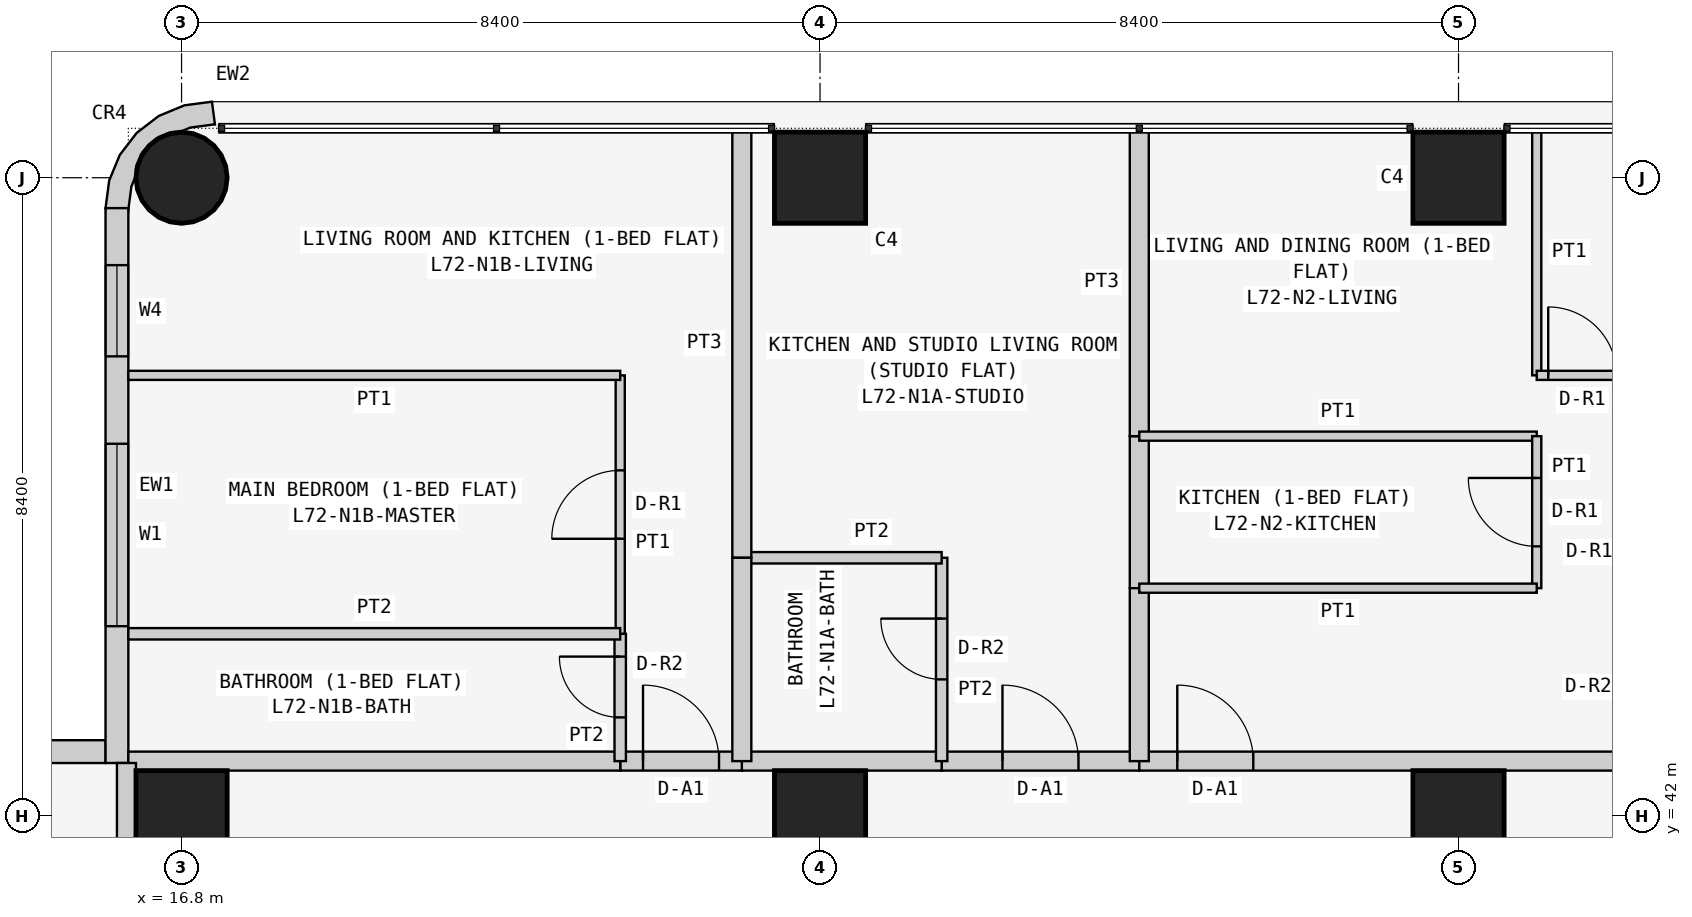
"""IFC4 building model, lengths in metres.
Left out: names, types, materials, properties, quantities, classifications, styles, units other than length and angle.
Written with IfcOpenShell. Run it as: python <this file> out.ifc"""

import sys

from ifc_helpers import new_model, si_unit, direction, frame, frame_2d, origin, origin_2d, place, context, subcontext, project, spatial, polyline, rectangle, circle, outline, extrude, element, fill, save


model = new_model("IFC4")
c1 = context("Model", 3, precision=1e-05, world=origin(), true_north=direction((0.0, 1.0)))
c2 = subcontext(c1, "Body", "Model", "MODEL_VIEW")
j1 = project(units=[si_unit("LENGTHUNIT", "METRE"), si_unit("PLANEANGLEUNIT", "RADIAN")], contexts=[c1])
p1 = place(None, origin())
s1 = spatial("IfcSite", under=j1, at=p1, CompositionType="ELEMENT")
p2 = place(p1, origin())
s2 = spatial("IfcBuilding", under=s1, at=p2, CompositionType="ELEMENT")
p3 = place(p2, frame((0.0, 0.0, 275.7)))
s3 = spatial("IfcBuildingStorey", under=s2, at=p3, CompositionType="ELEMENT", Elevation=275.7)
p4 = place(p3, frame((16.8, 42.0, 0.0), z_axis=(0.0, 0.0, 1.0), x_axis=(1.0, 0.0, 0.0)))
e1 = element("IfcColumn", 1, at=p4, inside=s3, PredefinedType="COLUMN", context=c2, shape_type="SweptSolid", body=[
    extrude(rectangle(XDim=1.2, YDim=1.2, at=origin_2d()), origin(), (0.0, 0.0, 1.0), 3.6),
])
p5 = place(p3, frame((16.8, 50.4, 0.0), z_axis=(0.0, 0.0, 1.0), x_axis=(1.0, 0.0, 0.0)))
e2 = element("IfcColumn", 2, at=p5, inside=s3, PredefinedType="COLUMN", context=c2, shape_type="SweptSolid", body=[
    extrude(circle(Radius=0.6, at=origin_2d()), origin(), (0.0, 0.0, 1.0), 3.6),
])
for number, where, z_axis, x_axis in (
    (3, (25.2, 42.0, 0.0), (0.0, 0.0, 1.0), (1.0, 0.0, 0.0)),
    (4, (25.2, 50.4, 0.0), (0.0, 0.0, 1.0), (1.0, 0.0, 0.0)),
    (5, (33.6, 42.0, 0.0), (0.0, 0.0, 1.0), (1.0, 0.0, 0.0)),
    (6, (33.6, 50.4, 0.0), (0.0, 0.0, 1.0), (1.0, 0.0, 0.0)),
):
    element("IfcColumn", number, at=place(p3, frame(where, z_axis=z_axis, x_axis=x_axis)), inside=s3, PredefinedType="COLUMN", context=c2, shape_type="SweptSolid", body=[
        extrude(rectangle(XDim=1.2, YDim=1.2, at=origin_2d()), origin(), (0.0, 0.0, 1.0), 3.6),
    ])
p6 = place(p3, frame((15.8, 42.85, 0.0), z_axis=(0.0, 0.0, 1.0), x_axis=(-1.0, 0.0, 0.0)))
e7 = element("IfcWall", 7, at=p6, inside=s3, PredefinedType="SOLIDWALL", context=c2, shape_type="SweptSolid", body=[
    extrude(rectangle(XDim=7.0, YDim=0.3, at=frame_2d((3.5, 0.0))), origin(), (0.0, 0.0, 1.0), 3.45),
])
p7 = place(p6, frame((1.5, 0.0, 0.9)))
e8 = element("IfcOpeningElement", 8, at=p7, cuts=e7, PredefinedType="OPENING", context=c2, shape_type="SweptSolid", body=[
    extrude(rectangle(XDim=2.4, YDim=1.5, at=frame_2d((1.2, 0.75))), frame((0.0, 0.16, 0.0), z_axis=(0.0, -1.0, 0.0), x_axis=(1.0, 0.0, 0.0)), (0.0, 0.0, 1.0), 0.32),
])
p8 = place(p6, frame((5.05, 0.0, 0.9)))
e9 = element("IfcOpeningElement", 9, at=p8, cuts=e7, PredefinedType="OPENING", context=c2, shape_type="SweptSolid", body=[
    extrude(rectangle(XDim=1.2, YDim=1.5, at=frame_2d((0.6, 0.75))), frame((0.0, 0.16, 0.0), z_axis=(0.0, -1.0, 0.0), x_axis=(1.0, 0.0, 0.0)), (0.0, 0.0, 1.0), 0.32),
])
p9 = place(p3, frame((15.95, 50.0, 0.0), z_axis=(0.0, 0.0, 1.0), x_axis=(0.0, -1.0, 0.0)))
e10 = element("IfcWall", 10, at=p9, inside=s3, PredefinedType="SOLIDWALL", context=c2, shape_type="SweptSolid", body=[
    extrude(rectangle(XDim=7.3, YDim=0.3, at=frame_2d((3.65, 0.0))), origin(), (0.0, 0.0, 1.0), 3.45),
])
p10 = place(p9, frame((3.1, 0.0, 0.9)))
e11 = element("IfcOpeningElement", 11, at=p10, cuts=e10, PredefinedType="OPENING", context=c2, shape_type="SweptSolid", body=[
    extrude(rectangle(XDim=2.4, YDim=1.5, at=frame_2d((1.2, 0.75))), frame((0.0, 0.16, 0.0), z_axis=(0.0, -1.0, 0.0), x_axis=(1.0, 0.0, 0.0)), (0.0, 0.0, 1.0), 0.32),
])
p11 = place(p9, frame((0.75, 0.0, 0.9)))
e12 = element("IfcOpeningElement", 12, at=p11, cuts=e10, PredefinedType="OPENING", context=c2, shape_type="SweptSolid", body=[
    extrude(rectangle(XDim=1.2, YDim=1.5, at=frame_2d((0.6, 0.75))), frame((0.0, 0.16, 0.0), z_axis=(0.0, -1.0, 0.0), x_axis=(1.0, 0.0, 0.0)), (0.0, 0.0, 1.0), 0.32),
])
p12 = place(p3, frame((17.162, 50.976, 0.0), z_axis=(0.0, 0.0, 1.0), x_axis=(-0.707106781187, 0.707106781187, 0.0)))
e13 = element("IfcWall", 13, at=p12, inside=s3, PredefinedType="SOLIDWALL", context=c2, shape_type="SweptSolid", body=[
    extrude(outline(polyline([(0.047, -0.129), (0.033, -0.143), (0.273, -0.327), (0.495, -0.037), (0.635, 0.301), (0.683, 0.663), (0.635, 1.025), (0.495, 1.363), (0.273, 1.653), (0.033, 1.469), (0.047, 1.455), (0.233, 1.212), (0.292, 1.069), (0.358, 1.003), (0.449, 0.782), (0.449, 0.543), (0.358, 0.322), (0.292, 0.257), (0.233, 0.114), (0.047, -0.129)])), origin(), (0.0, 0.0, 1.0), 3.45),
])
p13 = place(p3, frame((26.8, 42.725, 0.0), z_axis=(0.0, 0.0, 1.0), x_axis=(1.0, 0.0, 0.0)))
e14 = element("IfcWall", 14, at=p13, inside=s3, PredefinedType="PARTITIONING", context=c2, shape_type="SweptSolid", body=[
    extrude(rectangle(XDim=2.6, YDim=0.25, at=frame_2d((1.3, 0.0))), origin(), (0.0, 0.0, 1.0), 3.45),
])
p14 = place(p13, frame((0.8, 0.0, 0.0)))
e15 = element("IfcOpeningElement", 15, at=p14, cuts=e14, PredefinedType="OPENING", context=c2, shape_type="SweptSolid", body=[
    extrude(rectangle(XDim=1.0, YDim=2.1, at=frame_2d((0.5, 1.05))), frame((0.0, 0.135, 0.0), z_axis=(0.0, -1.0, 0.0), x_axis=(1.0, 0.0, 0.0)), (0.0, 0.0, 1.0), 0.27),
])
p15 = place(p3, frame((24.171, 42.725, 0.0), z_axis=(0.0, 0.0, 1.0), x_axis=(1.0, 0.0, 0.0)))
e16 = element("IfcWall", 16, at=p15, inside=s3, PredefinedType="PARTITIONING", context=c2, shape_type="SweptSolid", body=[
    extrude(rectangle(XDim=2.629, YDim=0.25, at=frame_2d((1.314, 0.0))), origin(), (0.0, 0.0, 1.0), 3.45),
])
p16 = place(p3, frame((22.571, 42.725, 0.0), z_axis=(0.0, 0.0, 1.0), x_axis=(1.0, 0.0, 0.0)))
e17 = element("IfcWall", 17, at=p16, inside=s3, PredefinedType="PARTITIONING", context=c2, shape_type="SweptSolid", body=[
    extrude(rectangle(XDim=1.6, YDim=0.25, at=frame_2d((0.8, 0.0))), origin(), (0.0, 0.0, 1.0), 3.45),
])
p17 = place(p16, frame((0.3, 0.0, 0.0)))
e18 = element("IfcOpeningElement", 18, at=p17, cuts=e17, PredefinedType="OPENING", context=c2, shape_type="SweptSolid", body=[
    extrude(rectangle(XDim=1.0, YDim=2.1, at=frame_2d((0.5, 1.05))), frame((0.0, 0.135, 0.0), z_axis=(0.0, -1.0, 0.0), x_axis=(1.0, 0.0, 0.0)), (0.0, 0.0, 1.0), 0.27),
])
p18 = place(p3, frame((16.1, 42.725, 0.0), z_axis=(0.0, 0.0, 1.0), x_axis=(1.0, 0.0, 0.0)))
e19 = element("IfcWall", 19, at=p18, inside=s3, PredefinedType="PARTITIONING", context=c2, shape_type="SweptSolid", body=[
    extrude(rectangle(XDim=6.471, YDim=0.25, at=frame_2d((3.235, 0.0))), origin(), (0.0, 0.0, 1.0), 3.45),
])
p19 = place(p3, frame((29.4, 42.725, 0.0), z_axis=(0.0, 0.0, 1.0), x_axis=(1.0, 0.0, 0.0)))
e20 = element("IfcWall", 20, at=p19, inside=s3, PredefinedType="PARTITIONING", context=c2, shape_type="SweptSolid", body=[
    extrude(rectangle(XDim=6.429, YDim=0.25, at=frame_2d((3.215, 0.0))), origin(), (0.0, 0.0, 1.0), 3.45),
])
p20 = place(p19, frame((0.5, 0.0, 0.0)))
e21 = element("IfcOpeningElement", 21, at=p20, cuts=e20, PredefinedType="OPENING", context=c2, shape_type="SweptSolid", body=[
    extrude(rectangle(XDim=1.0, YDim=2.1, at=frame_2d((0.5, 1.05))), frame((0.0, 0.135, 0.0), z_axis=(0.0, -1.0, 0.0), x_axis=(1.0, 0.0, 0.0)), (0.0, 0.0, 1.0), 0.27),
])
p21 = place(p3, frame((16.075, 35.829, 0.0), z_axis=(0.0, 0.0, 1.0), x_axis=(0.0, 1.0, 0.0)))
e22 = element("IfcWall", 22, at=p21, inside=s3, PredefinedType="PARTITIONING", context=c2, shape_type="SweptSolid", body=[
    extrude(rectangle(XDim=6.871, YDim=0.25, at=frame_2d((3.436, 0.0))), origin(), (0.0, 0.0, 1.0), 3.45),
])
p22 = place(p3, frame((26.8, 42.725, 0.0), z_axis=(0.0, 0.0, 1.0), x_axis=(0.0, 1.0, 0.0)))
e23 = element("IfcWall", 23, at=p22, inside=s3, PredefinedType="PARTITIONING", context=c2, shape_type="SweptSolid", body=[
    extrude(rectangle(XDim=2.675, YDim=0.15, at=frame_2d((1.337, 0.0))), origin(), (0.0, 0.0, 1.0), 3.45),
])
p23 = place(p22, frame((1.075, 0.0, 0.0)))
e24 = element("IfcOpeningElement", 24, at=p23, cuts=e23, PredefinedType="OPENING", context=c2, shape_type="SweptSolid", body=[
    extrude(rectangle(XDim=0.8, YDim=2.1, at=frame_2d((0.4, 1.05))), frame((0.0, 0.085, 0.0), z_axis=(0.0, -1.0, 0.0), x_axis=(1.0, 0.0, 0.0)), (0.0, 0.0, 1.0), 0.17),
])
p24 = place(p3, frame((26.8, 45.4, 0.0), z_axis=(0.0, 0.0, 1.0), x_axis=(-1.0, 0.0, 0.0)))
e25 = element("IfcWall", 25, at=p24, inside=s3, PredefinedType="PARTITIONING", context=c2, shape_type="SweptSolid", body=[
    extrude(rectangle(XDim=2.629, YDim=0.15, at=frame_2d((1.314, 0.0))), origin(), (0.0, 0.0, 1.0), 3.45),
])
p25 = place(p3, frame((24.171, 45.4, 0.0), z_axis=(0.0, 0.0, 1.0), x_axis=(0.0, 1.0, 0.0)))
e26 = element("IfcWall", 26, at=p25, inside=s3, PredefinedType="PARTITIONING", context=c2, shape_type="SweptSolid", body=[
    extrude(rectangle(XDim=5.65, YDim=0.25, at=frame_2d((2.825, 0.0))), origin(), (0.0, 0.0, 1.0), 3.45),
])
p26 = place(p3, frame((29.4, 47.0, 0.0), z_axis=(0.0, 0.0, 1.0), x_axis=(0.0, -1.0, 0.0)))
e27 = element("IfcWall", 27, at=p26, inside=s3, PredefinedType="PARTITIONING", context=c2, shape_type="SweptSolid", body=[
    extrude(rectangle(XDim=2.0, YDim=0.25, at=frame_2d((1.0, 0.0))), origin(), (0.0, 0.0, 1.0), 2.848),
])
p27 = place(p3, frame((29.4, 45.0, 0.0), z_axis=(0.0, 0.0, 1.0), x_axis=(0.0, -1.0, 0.0)))
e28 = element("IfcWall", 28, at=p27, inside=s3, PredefinedType="PARTITIONING", context=c2, shape_type="SweptSolid", body=[
    extrude(rectangle(XDim=2.275, YDim=0.25, at=frame_2d((1.137, 0.0))), origin(), (0.0, 0.0, 1.0), 2.848),
])
p28 = place(p3, frame((29.4, 51.05, 0.0), z_axis=(0.0, 0.0, 1.0), x_axis=(0.0, -1.0, 0.0)))
e29 = element("IfcWall", 29, at=p28, inside=s3, PredefinedType="PARTITIONING", context=c2, shape_type="SweptSolid", body=[
    extrude(rectangle(XDim=4.05, YDim=0.25, at=frame_2d((2.025, 0.0))), origin(), (0.0, 0.0, 1.0), 2.848),
])
p29 = place(p3, frame((24.171, 45.4, 0.0), z_axis=(0.0, 0.0, 1.0), x_axis=(0.0, -1.0, 0.0)))
e30 = element("IfcWall", 30, at=p29, inside=s3, PredefinedType="PARTITIONING", context=c2, shape_type="SweptSolid", body=[
    extrude(rectangle(XDim=2.675, YDim=0.25, at=frame_2d((1.337, 0.0))), origin(), (0.0, 0.0, 1.0), 3.45),
])
p30 = place(p3, frame((22.571, 42.725, 0.0), z_axis=(0.0, 0.0, 1.0), x_axis=(0.0, 1.0, 0.0)))
e31 = element("IfcWall", 31, at=p30, inside=s3, PredefinedType="PARTITIONING", context=c2, shape_type="SweptSolid", body=[
    extrude(rectangle(XDim=1.675, YDim=0.15, at=frame_2d((0.837, 0.0))), origin(), (0.0, 0.0, 1.0), 3.45),
])
p31 = place(p30, frame((0.575, 0.0, 0.0)))
e32 = element("IfcOpeningElement", 32, at=p31, cuts=e31, PredefinedType="OPENING", context=c2, shape_type="SweptSolid", body=[
    extrude(rectangle(XDim=0.8, YDim=2.1, at=frame_2d((0.4, 1.05))), frame((0.0, 0.085, 0.0), z_axis=(0.0, -1.0, 0.0), x_axis=(1.0, 0.0, 0.0)), (0.0, 0.0, 1.0), 0.17),
])
p32 = place(p3, frame((22.571, 44.4, 0.0), z_axis=(0.0, 0.0, 1.0), x_axis=(0.0, 1.0, 0.0)))
e33 = element("IfcWall", 33, at=p32, inside=s3, PredefinedType="PARTITIONING", context=c2, shape_type="SweptSolid", body=[
    extrude(rectangle(XDim=3.4, YDim=0.12, at=frame_2d((1.7, 0.0))), origin(), (0.0, 0.0, 1.0), 3.45),
])
p33 = place(p32, frame((1.25, 0.0, 0.0)))
e34 = element("IfcOpeningElement", 34, at=p33, cuts=e33, PredefinedType="OPENING", context=c2, shape_type="SweptSolid", body=[
    extrude(rectangle(XDim=0.9, YDim=2.1, at=frame_2d((0.45, 1.05))), frame((0.0, 0.07, 0.0), z_axis=(0.0, -1.0, 0.0), x_axis=(1.0, 0.0, 0.0)), (0.0, 0.0, 1.0), 0.14),
])
p34 = place(p3, frame((22.571, 47.8, 0.0), z_axis=(0.0, 0.0, 1.0), x_axis=(-1.0, 0.0, 0.0)))
e35 = element("IfcWall", 35, at=p34, inside=s3, PredefinedType="PARTITIONING", context=c2, shape_type="SweptSolid", body=[
    extrude(rectangle(XDim=6.471, YDim=0.12, at=frame_2d((3.235, 0.0))), origin(), (0.0, 0.0, 1.0), 3.45),
])
p35 = place(p3, frame((22.571, 44.4, 0.0), z_axis=(0.0, 0.0, 1.0), x_axis=(-1.0, 0.0, 0.0)))
e36 = element("IfcWall", 36, at=p35, inside=s3, PredefinedType="PARTITIONING", context=c2, shape_type="SweptSolid", body=[
    extrude(rectangle(XDim=6.471, YDim=0.15, at=frame_2d((3.235, 0.0))), origin(), (0.0, 0.0, 1.0), 3.45),
])
p36 = place(p3, frame((29.4, 47.0, 0.0), z_axis=(0.0, 0.0, 1.0), x_axis=(1.0, 0.0, 0.0)))
e37 = element("IfcWall", 37, at=p36, inside=s3, PredefinedType="PARTITIONING", context=c2, shape_type="SweptSolid", body=[
    extrude(rectangle(XDim=5.229, YDim=0.12, at=frame_2d((2.615, 0.0))), origin(), (0.0, 0.0, 1.0), 3.45),
])
p37 = place(p3, frame((34.629, 47.0, 0.0), z_axis=(0.0, 0.0, 1.0), x_axis=(0.0, -1.0, 0.0)))
e38 = element("IfcWall", 38, at=p37, inside=s3, PredefinedType="PARTITIONING", context=c2, shape_type="SweptSolid", body=[
    extrude(rectangle(XDim=2.0, YDim=0.12, at=frame_2d((1.0, 0.0))), origin(), (0.0, 0.0, 1.0), 3.45),
])
p38 = place(p37, frame((0.55, 0.0, 0.0)))
e39 = element("IfcOpeningElement", 39, at=p38, cuts=e38, PredefinedType="OPENING", context=c2, shape_type="SweptSolid", body=[
    extrude(rectangle(XDim=0.9, YDim=2.1, at=frame_2d((0.45, 1.05))), frame((0.0, 0.07, 0.0), z_axis=(0.0, -1.0, 0.0), x_axis=(1.0, 0.0, 0.0)), (0.0, 0.0, 1.0), 0.14),
])
p39 = place(p3, frame((34.629, 45.0, 0.0), z_axis=(0.0, 0.0, 1.0), x_axis=(-1.0, 0.0, 0.0)))
e40 = element("IfcWall", 40, at=p39, inside=s3, PredefinedType="PARTITIONING", context=c2, shape_type="SweptSolid", body=[
    extrude(rectangle(XDim=5.229, YDim=0.12, at=frame_2d((2.615, 0.0))), origin(), (0.0, 0.0, 1.0), 3.45),
])
p40 = place(p3, frame((34.629, 51.05, 0.0), z_axis=(0.0, 0.0, 1.0), x_axis=(0.0, -1.0, 0.0)))
e41 = element("IfcWall", 41, at=p40, inside=s3, PredefinedType="PARTITIONING", context=c2, shape_type="SweptSolid", body=[
    extrude(rectangle(XDim=3.25, YDim=0.12, at=frame_2d((1.625, 0.0))), origin(), (0.0, 0.0, 1.0), 3.45),
])
p41 = place(p3, frame((34.629, 47.8, 0.0), z_axis=(0.0, 0.0, 1.0), x_axis=(1.0, 0.0, 0.0)))
e42 = element("IfcWall", 42, at=p41, inside=s3, PredefinedType="PARTITIONING", context=c2, shape_type="SweptSolid", body=[
    extrude(rectangle(XDim=1.2, YDim=0.12, at=frame_2d((0.6, 0.0))), origin(), (0.0, 0.0, 1.0), 3.45),
])
p42 = place(p41, frame((0.151, 0.0, 0.0)))
e43 = element("IfcOpeningElement", 43, at=p42, cuts=e42, PredefinedType="OPENING", context=c2, shape_type="SweptSolid", body=[
    extrude(rectangle(XDim=0.9, YDim=2.1, at=frame_2d((0.45, 1.05))), frame((0.0, 0.07, 0.0), z_axis=(0.0, -1.0, 0.0), x_axis=(1.0, 0.0, 0.0)), (0.0, 0.0, 1.0), 0.14),
])
p43 = place(p10, origin())
e44 = element("IfcWindow", 44, at=p43, inside=s3, PartitioningType="SINGLE_PANEL", PredefinedType="WINDOW", context=c2, shape_type="SweptSolid", body=[
    extrude(rectangle(XDim=2.4, YDim=1.5, at=frame_2d((1.2, 0.75))), frame((0.0, 0.03, 0.0), z_axis=(0.0, -1.0, 0.0), x_axis=(1.0, 0.0, 0.0)), (0.0, 0.0, 1.0), 0.06),
])
fill(e11, e44)
p44 = place(p11, origin())
e45 = element("IfcWindow", 45, at=p44, inside=s3, PartitioningType="SINGLE_PANEL", PredefinedType="WINDOW", context=c2, shape_type="SweptSolid", body=[
    extrude(rectangle(XDim=1.2, YDim=1.5, at=frame_2d((0.6, 0.75))), frame((0.0, 0.03, 0.0), z_axis=(0.0, -1.0, 0.0), x_axis=(1.0, 0.0, 0.0)), (0.0, 0.0, 1.0), 0.06),
])
fill(e12, e45)
p45 = place(p14, origin())
e46 = element("IfcDoor", 46, at=p45, inside=s3, OperationType="SINGLE_SWING_LEFT", PredefinedType="DOOR", context=c2, shape_type="SweptSolid", body=[
    extrude(rectangle(XDim=1.0, YDim=2.1, at=frame_2d((0.5, 1.05))), frame((0.0, 0.025, 0.0), z_axis=(0.0, -1.0, 0.0), x_axis=(1.0, 0.0, 0.0)), (0.0, 0.0, 1.0), 0.05),
])
fill(e15, e46)
p46 = place(p23, origin())
e47 = element("IfcDoor", 47, at=p46, inside=s3, OperationType="SINGLE_SWING_RIGHT", PredefinedType="DOOR", context=c2, shape_type="SweptSolid", body=[
    extrude(rectangle(XDim=0.8, YDim=2.1, at=frame_2d((0.4, 1.05))), frame((0.0, 0.025, 0.0), z_axis=(0.0, -1.0, 0.0), x_axis=(1.0, 0.0, 0.0)), (0.0, 0.0, 1.0), 0.05),
])
fill(e24, e47)
p47 = place(p17, origin())
e48 = element("IfcDoor", 48, at=p47, inside=s3, OperationType="SINGLE_SWING_LEFT", PredefinedType="DOOR", context=c2, shape_type="SweptSolid", body=[
    extrude(rectangle(XDim=1.0, YDim=2.1, at=frame_2d((0.5, 1.05))), frame((0.0, 0.025, 0.0), z_axis=(0.0, -1.0, 0.0), x_axis=(1.0, 0.0, 0.0)), (0.0, 0.0, 1.0), 0.05),
])
fill(e18, e48)
p48 = place(p31, origin())
e49 = element("IfcDoor", 49, at=p48, inside=s3, OperationType="SINGLE_SWING_RIGHT", PredefinedType="DOOR", context=c2, shape_type="SweptSolid", body=[
    extrude(rectangle(XDim=0.8, YDim=2.1, at=frame_2d((0.4, 1.05))), frame((0.0, 0.025, 0.0), z_axis=(0.0, -1.0, 0.0), x_axis=(1.0, 0.0, 0.0)), (0.0, 0.0, 1.0), 0.05),
])
fill(e32, e49)
p49 = place(p33, origin())
e50 = element("IfcDoor", 50, at=p49, inside=s3, OperationType="SINGLE_SWING_LEFT", PredefinedType="DOOR", context=c2, shape_type="SweptSolid", body=[
    extrude(rectangle(XDim=0.9, YDim=2.1, at=frame_2d((0.45, 1.05))), frame((0.0, 0.025, 0.0), z_axis=(0.0, -1.0, 0.0), x_axis=(1.0, 0.0, 0.0)), (0.0, 0.0, 1.0), 0.05),
])
fill(e34, e50)
p50 = place(p20, origin())
e51 = element("IfcDoor", 51, at=p50, inside=s3, OperationType="SINGLE_SWING_LEFT", PredefinedType="DOOR", context=c2, shape_type="SweptSolid", body=[
    extrude(rectangle(XDim=1.0, YDim=2.1, at=frame_2d((0.5, 1.05))), frame((0.0, 0.025, 0.0), z_axis=(0.0, -1.0, 0.0), x_axis=(1.0, 0.0, 0.0)), (0.0, 0.0, 1.0), 0.05),
])
fill(e21, e51)
p51 = place(p38, frame((0.9, 0.0, 0.0), z_axis=(0.0, 0.0, 1.0), x_axis=(-1.0, 0.0, 0.0)))
e52 = element("IfcDoor", 52, at=p51, inside=s3, OperationType="SINGLE_SWING_RIGHT", PredefinedType="DOOR", context=c2, shape_type="SweptSolid", body=[
    extrude(rectangle(XDim=0.9, YDim=2.1, at=frame_2d((0.45, 1.05))), frame((0.0, 0.025, 0.0), z_axis=(0.0, -1.0, 0.0), x_axis=(1.0, 0.0, 0.0)), (0.0, 0.0, 1.0), 0.05),
])
fill(e39, e52)
p52 = place(p42, origin())
e53 = element("IfcDoor", 53, at=p52, inside=s3, OperationType="SINGLE_SWING_LEFT", PredefinedType="DOOR", context=c2, shape_type="SweptSolid", body=[
    extrude(rectangle(XDim=0.9, YDim=2.1, at=frame_2d((0.45, 1.05))), frame((0.0, 0.025, 0.0), z_axis=(0.0, -1.0, 0.0), x_axis=(1.0, 0.0, 0.0)), (0.0, 0.0, 1.0), 0.05),
])
fill(e43, e53)
save(model, sys.argv[1])
